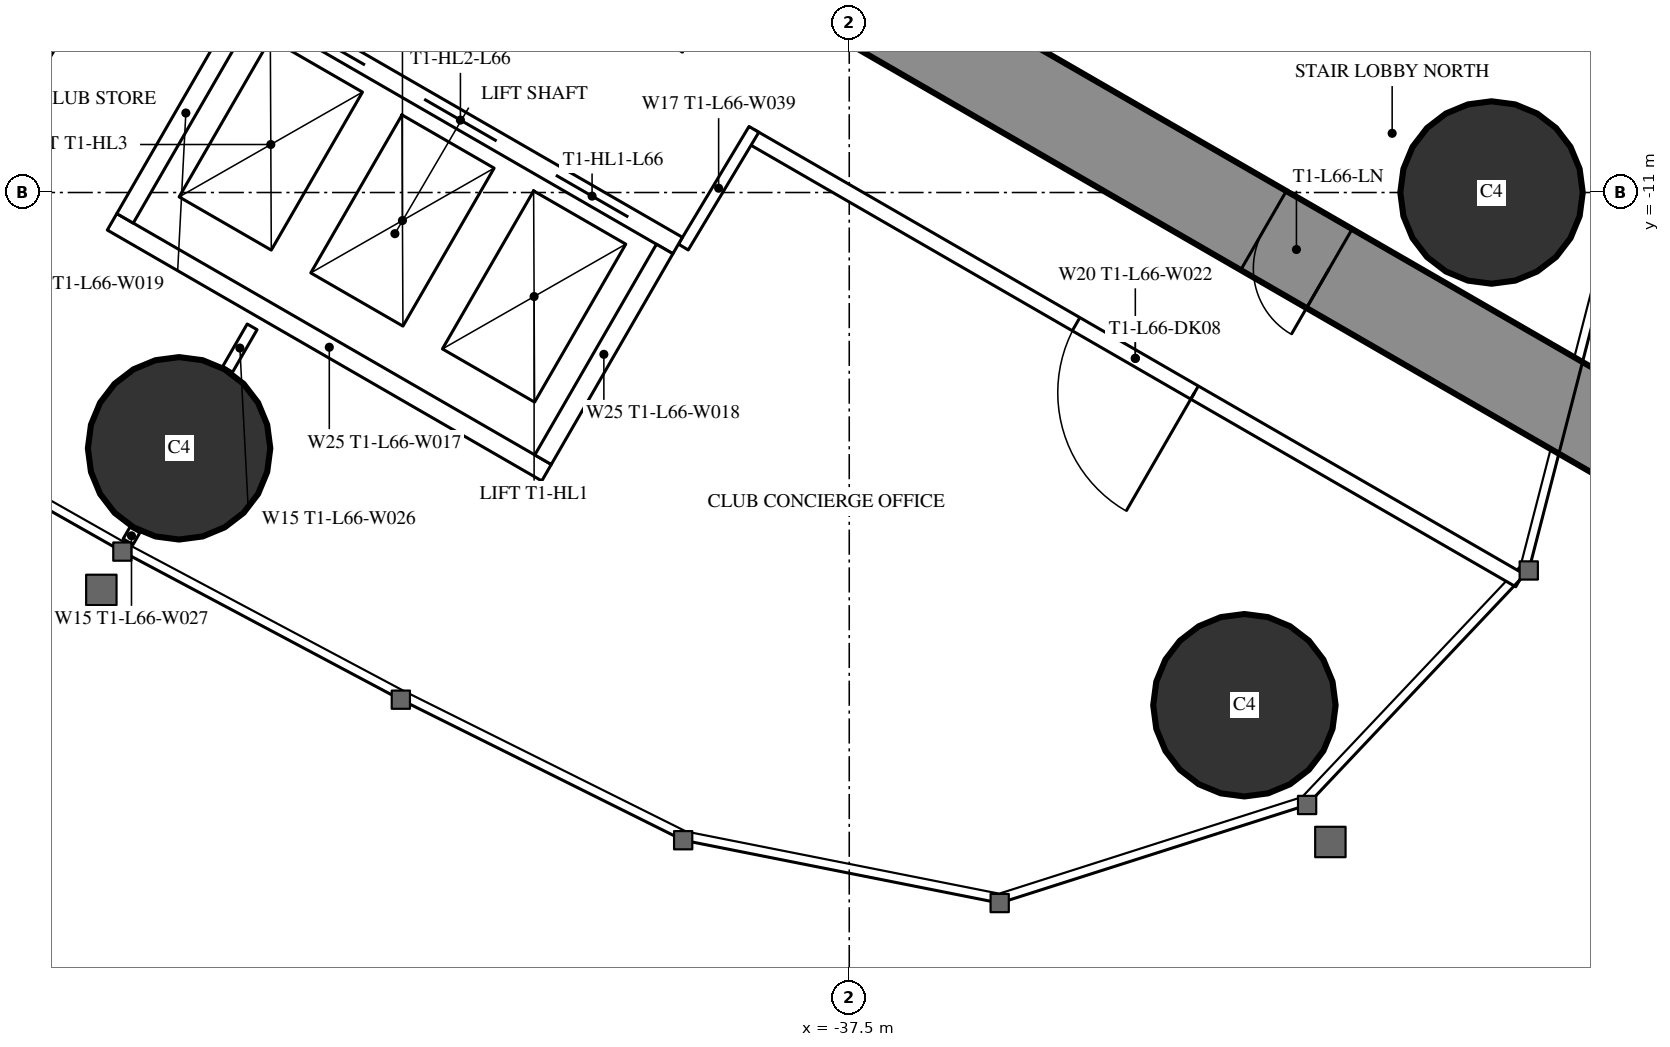
"""IFC4 building model, lengths in metres.
Left out: names, types, materials, properties, quantities, classifications, styles, units other than length and angle.
Written with IfcOpenShell. Run it as: python <this file> out.ifc"""

import sys

from ifc_helpers import new_model, si_unit, direction, frame, frame_2d, origin, origin_2d, place, context, subcontext, project, spatial, rectangle, circle, extrude, element, fill, save


model = new_model("IFC4")
c1 = context("Model", 3, precision=1e-05, world=origin(), true_north=direction((0.0, 1.0)))
c2 = subcontext(c1, "Body", "Model", "MODEL_VIEW")
j1 = project(units=[si_unit("LENGTHUNIT", "METRE"), si_unit("PLANEANGLEUNIT", "RADIAN")], contexts=[c1])
p1 = place(None, origin())
s1 = spatial("IfcSite", under=j1, at=p1, CompositionType="ELEMENT")
p2 = place(p1, origin())
s2 = spatial("IfcBuilding", under=s1, at=p2, CompositionType="ELEMENT")
p3 = place(p2, frame((0.0, 0.0, 247.7)))
s3 = spatial("IfcBuildingStorey", under=s2, at=p3, CompositionType="ELEMENT", Elevation=247.7)
for number, where, z_axis, x_axis in (
    (1, (-32.301, -17.745, 0.0), (0.0, 0.0, 1.0), (1.0, 0.0, 0.0)),
    (2, (-29.05, -11.0, 0.0), (0.0, 0.0, 1.0), (1.0, 0.0, 0.0)),
    (3, (-46.317, -14.365, 0.0), (0.0, 0.0, 1.0), (1.0, 0.0, 0.0)),
):
    element("IfcColumn", number, at=place(p3, frame(where, z_axis=z_axis, x_axis=x_axis)), inside=s3, PredefinedType="COLUMN", context=c2, shape_type="SweptSolid", body=[
        extrude(circle(Radius=1.2, at=origin_2d()), origin(), (0.0, 0.0, 1.0), 4.2),
    ])
p4 = place(p3, frame((-27.2, -14.3, 0.0), z_axis=(0.0, 0.0, 1.0), x_axis=(-0.866024021859, 0.500002393557, 0.0)))
e4 = element("IfcWall", 4, at=p4, inside=s3, PredefinedType="SHEAR", context=c2, shape_type="SweptSolid", body=[
    extrude(rectangle(XDim=27.907, YDim=1.2, at=frame_2d((13.954, 0.0))), origin(), (0.0, 0.0, 1.0), 4.2),
])
p5 = place(p4, frame((4.6, 0.0, 0.0)))
e5 = element("IfcOpeningElement", 5, at=p5, cuts=e4, PredefinedType="OPENING", context=c2, shape_type="SweptSolid", body=[
    extrude(rectangle(XDim=1.0, YDim=2.2, at=frame_2d((0.5, 1.1))), frame((0.0, 0.61, 0.0), z_axis=(0.0, -1.0, 0.0), x_axis=(1.0, 0.0, 0.0)), (0.0, 0.0, 1.0), 1.22),
])
p6 = place(p4, frame((13.395, 0.0, 0.0)))
e6 = element("IfcOpeningElement", 6, at=p6, cuts=e4, PredefinedType="OPENING", context=c2, shape_type="SweptSolid", body=[
    extrude(rectangle(XDim=1.8, YDim=2.2, at=frame_2d((0.9, 1.1))), frame((0.0, 0.61, 0.0), z_axis=(0.0, -1.0, 0.0), x_axis=(1.0, 0.0, 0.0)), (0.0, 0.0, 1.0), 1.22),
])
p7 = place(p3, frame((-46.898, -15.439, 0.0), z_axis=(0.0, 0.0, 1.0), x_axis=(-0.500232303069, -0.865891241997, 0.0)))
e7 = element("IfcWall", 7, at=p7, inside=s3, PredefinedType="PARTITIONING", context=c2, shape_type="SweptSolid", body=[
    extrude(rectangle(XDim=0.18, YDim=0.15, at=frame_2d((0.09, 0.0))), origin(), (0.0, 0.0, 1.0), 3.05),
])
p8 = place(p3, frame((-46.274, -6.059, 0.0), z_axis=(0.0, 0.0, 1.0), x_axis=(-0.500020471368, -0.866013584312, 0.0)))
e8 = element("IfcWall", 8, at=p8, inside=s3, PredefinedType="PARTITIONING", context=c2, shape_type="SweptSolid", body=[
    extrude(rectangle(XDim=6.028, YDim=0.15, at=frame_2d((3.014, 0.0))), origin(), (0.0, 0.0, 1.0), 3.05),
])
p9 = place(p3, frame((-45.356, -12.767, 0.0), z_axis=(0.0, 0.0, 1.0), x_axis=(-0.499886366516, -0.866091000168, 0.0)))
e9 = element("IfcWall", 9, at=p9, inside=s3, PredefinedType="PARTITIONING", context=c2, shape_type="SweptSolid", body=[
    extrude(rectangle(XDim=0.645, YDim=0.15, at=frame_2d((0.322, 0.0))), origin(), (0.0, 0.0, 1.0), 3.95),
])
p10 = place(p3, frame((-28.681, -16.101, 0.0), z_axis=(0.0, 0.0, 1.0), x_axis=(-0.866026079773, 0.499998829152, 0.0)))
e10 = element("IfcWall", 10, at=p10, inside=s3, PredefinedType="PARTITIONING", context=c2, shape_type="SweptSolid", body=[
    extrude(rectangle(XDim=11.674, YDim=0.2, at=frame_2d((5.837, 0.0))), origin(), (0.0, 0.0, 1.0), 3.95),
])
p11 = place(p10, frame((4.937, 0.0, 0.0)))
e11 = element("IfcOpeningElement", 11, at=p11, cuts=e10, PredefinedType="OPENING", context=c2, shape_type="SweptSolid", body=[
    extrude(rectangle(XDim=1.8, YDim=2.2, at=frame_2d((0.9, 1.1))), frame((0.0, 0.11, 0.0), z_axis=(0.0, -1.0, 0.0), x_axis=(1.0, 0.0, 0.0)), (0.0, 0.0, 1.0), 0.22),
])
p12 = place(p3, frame((-39.683, -11.718, 0.0), z_axis=(0.0, 0.0, 1.0), x_axis=(0.514336634837, 0.857588377991, 0.0)))
e12 = element("IfcWall", 12, at=p12, inside=s3, PredefinedType="PARTITIONING", context=c2, shape_type="SweptSolid", body=[
    extrude(rectangle(XDim=1.805, YDim=0.15, at=frame_2d((0.903, 0.0))), origin(), (0.0, 0.0, 1.0), 3.95),
])
p13 = place(p3, frame((-39.758, -11.697, 0.0), z_axis=(0.0, 0.0, 1.0), x_axis=(-0.866024194504, 0.500002094529, 0.0)))
e13 = element("IfcWall", 13, at=p13, inside=s3, PredefinedType="PARTITIONING", context=c2, shape_type="SweptSolid", body=[
    extrude(rectangle(XDim=6.6, YDim=0.25, at=frame_2d((3.3, 0.0))), origin(), (0.0, 0.0, 1.0), 3.95),
])
p14 = place(p13, frame((0.75, 0.0, 0.0)))
e14 = element("IfcOpeningElement", 14, at=p14, cuts=e13, PredefinedType="OPENING", context=c2, shape_type="SweptSolid", body=[
    extrude(rectangle(XDim=1.1, YDim=2.2, at=frame_2d((0.55, 1.1))), frame((0.0, 0.135, 0.0), z_axis=(0.0, -1.0, 0.0), x_axis=(1.0, 0.0, 0.0)), (0.0, 0.0, 1.0), 0.27),
])
p15 = place(p13, frame((2.75, 0.0, 0.0)))
e15 = element("IfcOpeningElement", 15, at=p15, cuts=e13, PredefinedType="OPENING", context=c2, shape_type="SweptSolid", body=[
    extrude(rectangle(XDim=1.1, YDim=2.2, at=frame_2d((0.55, 1.1))), frame((0.0, 0.135, 0.0), z_axis=(0.0, -1.0, 0.0), x_axis=(1.0, 0.0, 0.0)), (0.0, 0.0, 1.0), 0.27),
])
p16 = place(p13, frame((4.75, 0.0, 0.0)))
e16 = element("IfcOpeningElement", 16, at=p16, cuts=e13, PredefinedType="OPENING", context=c2, shape_type="SweptSolid", body=[
    extrude(rectangle(XDim=1.1, YDim=2.2, at=frame_2d((0.55, 1.1))), frame((0.0, 0.135, 0.0), z_axis=(0.0, -1.0, 0.0), x_axis=(1.0, 0.0, 0.0)), (0.0, 0.0, 1.0), 0.27),
])
p17 = place(p3, frame((-41.482, -14.686, 0.0), z_axis=(0.0, 0.0, 1.0), x_axis=(-0.86603344179, 0.499986077507, 0.0)))
e17 = element("IfcWall", 17, at=p17, inside=s3, PredefinedType="PARTITIONING", context=c2, shape_type="SweptSolid", body=[
    extrude(rectangle(XDim=6.6, YDim=0.25, at=frame_2d((3.3, 0.0))), origin(), (0.0, 0.0, 1.0), 3.95),
])
for number, where, z_axis, x_axis in (
    (18, (-39.928, -11.743, 0.0), (0.0, 0.0, 1.0), (-0.5, -0.866, 0.0)),
    (19, (-45.428, -8.568, 0.0), (0.0, 0.0, 1.0), (-0.5, -0.866, 0.0)),
):
    element("IfcWall", number, at=place(p3, frame(where, z_axis=z_axis, x_axis=x_axis)), inside=s3, PredefinedType="PARTITIONING", context=c2, shape_type="SweptSolid", body=[
        extrude(rectangle(XDim=3.201, YDim=0.25, at=frame_2d((1.6, 0.0))), origin(), (0.0, 0.0, 1.0), 3.95),
    ])
p18 = place(p11, origin())
e20 = element("IfcDoor", 20, at=p18, inside=s3, OperationType="DOUBLE_DOOR_SINGLE_SWING", PredefinedType="DOOR", context=c2, shape_type="SweptSolid", body=[
    extrude(rectangle(XDim=1.8, YDim=2.2, at=frame_2d((0.9, 1.1))), frame((0.0, 0.025, 0.0), z_axis=(0.0, -1.0, 0.0), x_axis=(1.0, 0.0, 0.0)), (0.0, 0.0, 1.0), 0.05),
])
fill(e11, e20)
p19 = place(p5, origin())
e21 = element("IfcDoor", 21, at=p19, inside=s3, OperationType="SINGLE_SWING_LEFT", PredefinedType="DOOR", context=c2, shape_type="SweptSolid", body=[
    extrude(rectangle(XDim=1.0, YDim=2.2, at=frame_2d((0.5, 1.1))), frame((0.0, 0.025, 0.0), z_axis=(0.0, -1.0, 0.0), x_axis=(1.0, 0.0, 0.0)), (0.0, 0.0, 1.0), 0.05),
])
fill(e5, e21)
p20 = place(p14, origin())
e22 = element("IfcDoor", 22, at=p20, inside=s3, OperationType="DOUBLE_DOOR_SLIDING", PredefinedType="USERDEFINED", context=c2, shape_type="SweptSolid", body=[
    extrude(rectangle(XDim=1.1, YDim=2.2, at=frame_2d((0.55, 1.1))), frame((0.0, 0.025, 0.0), z_axis=(0.0, -1.0, 0.0), x_axis=(1.0, 0.0, 0.0)), (0.0, 0.0, 1.0), 0.05),
])
fill(e14, e22)
p21 = place(p15, origin())
e23 = element("IfcDoor", 23, at=p21, inside=s3, OperationType="DOUBLE_DOOR_SLIDING", PredefinedType="USERDEFINED", context=c2, shape_type="SweptSolid", body=[
    extrude(rectangle(XDim=1.1, YDim=2.2, at=frame_2d((0.55, 1.1))), frame((0.0, 0.025, 0.0), z_axis=(0.0, -1.0, 0.0), x_axis=(1.0, 0.0, 0.0)), (0.0, 0.0, 1.0), 0.05),
])
fill(e15, e23)
p22 = place(p16, origin())
e24 = element("IfcDoor", 24, at=p22, inside=s3, OperationType="DOUBLE_DOOR_SLIDING", PredefinedType="USERDEFINED", context=c2, shape_type="SweptSolid", body=[
    extrude(rectangle(XDim=1.1, YDim=2.2, at=frame_2d((0.55, 1.1))), frame((0.0, 0.025, 0.0), z_axis=(0.0, -1.0, 0.0), x_axis=(1.0, 0.0, 0.0)), (0.0, 0.0, 1.0), 0.05),
])
fill(e16, e24)
save(model, sys.argv[1])
